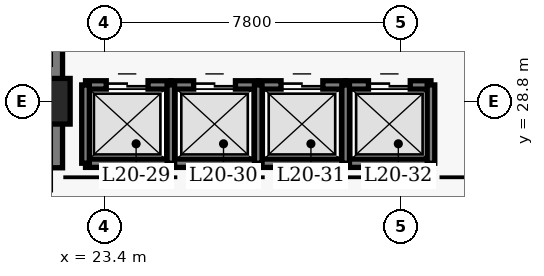
"""IFC4 building model, lengths in metres.
Left out: names, types, materials, properties, quantities, classifications, styles, units other than length and angle.
Written with IfcOpenShell. Run it as: python <this file> out.ifc"""

import sys

from ifc_helpers import new_model, si_unit, direction, frame, frame_2d, origin, origin_2d, place, context, subcontext, project, spatial, rectangle, extrude, element, fill, save


model = new_model("IFC4")
c1 = context("Model", 3, precision=1e-05, world=origin(), true_north=direction((0.0, 1.0)))
c2 = subcontext(c1, "Body", "Model", "MODEL_VIEW")
j1 = project(units=[si_unit("LENGTHUNIT", "METRE"), si_unit("PLANEANGLEUNIT", "RADIAN")], contexts=[c1])
p1 = place(None, origin())
s1 = spatial("IfcSite", under=j1, at=p1, CompositionType="ELEMENT")
p2 = place(p1, origin())
s2 = spatial("IfcBuilding", under=s1, at=p2, CompositionType="ELEMENT")
p3 = place(p2, frame((0.0, 0.0, 84.2)))
s3 = spatial("IfcBuildingStorey", under=s2, at=p3, CompositionType="ELEMENT", Elevation=84.2)
p4 = place(p3, frame((21.9, 27.05, 0.0), z_axis=(0.0, 0.0, 1.0), x_axis=(0.0, 1.0, 0.0)))
e1 = element("IfcWall", 1, at=p4, inside=s3, PredefinedType="SHEAR", context=c2, shape_type="SweptSolid", body=[
    extrude(rectangle(XDim=13.67, YDim=0.8, at=frame_2d((6.835, 0.0))), origin(), (0.0, 0.0, 1.0), 3.8),
])
p5 = place(p3, frame((21.9, 28.8, 0.0), z_axis=(0.0, 0.0, 1.0), x_axis=(1.0, 0.0, 0.0)))
e2 = element("IfcColumn", 2, at=p5, inside=s3, PredefinedType="COLUMN", context=c2, shape_type="SweptSolid", body=[
    extrude(rectangle(XDim=1.2, YDim=1.2, at=origin_2d()), origin(), (0.0, 0.0, 1.0), 3.8),
])
p6 = place(p3, frame((22.905, 29.23, 0.0), z_axis=(0.0, 0.0, 1.0), x_axis=(1.0, 0.0, 0.0)))
e3 = element("IfcWall", 3, at=p6, inside=s3, PredefinedType="SHEAR", context=c2, shape_type="SweptSolid", body=[
    extrude(rectangle(XDim=2.245, YDim=0.22, at=frame_2d((1.123, 0.0))), origin(), (0.0, 0.0, 1.0), 3.8),
])
p7 = place(p6, frame((0.545, 0.0, 0.0)))
e4 = element("IfcOpeningElement", 4, at=p7, cuts=e3, PredefinedType="OPENING", context=c2, shape_type="SweptSolid", body=[
    extrude(rectangle(XDim=1.1, YDim=2.15, at=frame_2d((0.55, 1.075))), frame((0.0, 0.12, 0.0), z_axis=(0.0, -1.0, 0.0), x_axis=(1.0, 0.0, 0.0)), (0.0, 0.0, 1.0), 0.24),
])
p8 = place(p3, frame((22.905, 27.17, 0.0), z_axis=(0.0, 0.0, 1.0), x_axis=(1.0, 0.0, 0.0)))
e5 = element("IfcWall", 5, at=p8, inside=s3, PredefinedType="SHEAR", context=c2, shape_type="SweptSolid", body=[
    extrude(rectangle(XDim=2.245, YDim=0.22, at=frame_2d((1.123, 0.0))), origin(), (0.0, 0.0, 1.0), 3.8),
])
p9 = place(p3, frame((22.905, 27.17, 0.0), z_axis=(0.0, 0.0, 1.0), x_axis=(0.0, 1.0, 0.0)))
e6 = element("IfcWall", 6, at=p9, inside=s3, PredefinedType="SHEAR", context=c2, shape_type="SweptSolid", body=[
    extrude(rectangle(XDim=2.06, YDim=0.2, at=frame_2d((1.03, 0.0))), origin(), (0.0, 0.0, 1.0), 3.8),
])
p10 = place(p3, frame((25.15, 29.23, 0.0), z_axis=(0.0, 0.0, 1.0), x_axis=(1.0, 0.0, 0.0)))
e7 = element("IfcWall", 7, at=p10, inside=s3, PredefinedType="SHEAR", context=c2, shape_type="SweptSolid", body=[
    extrude(rectangle(XDim=2.3, YDim=0.22, at=frame_2d((1.15, 0.0))), origin(), (0.0, 0.0, 1.0), 3.8),
])
p11 = place(p10, frame((0.6, 0.0, 0.0)))
e8 = element("IfcOpeningElement", 8, at=p11, cuts=e7, PredefinedType="OPENING", context=c2, shape_type="SweptSolid", body=[
    extrude(rectangle(XDim=1.1, YDim=2.15, at=frame_2d((0.55, 1.075))), frame((0.0, 0.12, 0.0), z_axis=(0.0, -1.0, 0.0), x_axis=(1.0, 0.0, 0.0)), (0.0, 0.0, 1.0), 0.24),
])
p12 = place(p3, frame((25.15, 27.17, 0.0), z_axis=(0.0, 0.0, 1.0), x_axis=(1.0, 0.0, 0.0)))
e9 = element("IfcWall", 9, at=p12, inside=s3, PredefinedType="SHEAR", context=c2, shape_type="SweptSolid", body=[
    extrude(rectangle(XDim=2.3, YDim=0.22, at=frame_2d((1.15, 0.0))), origin(), (0.0, 0.0, 1.0), 3.8),
])
p13 = place(p3, frame((25.15, 27.17, 0.0), z_axis=(0.0, 0.0, 1.0), x_axis=(0.0, 1.0, 0.0)))
e10 = element("IfcWall", 10, at=p13, inside=s3, PredefinedType="SHEAR", context=c2, shape_type="SweptSolid", body=[
    extrude(rectangle(XDim=2.06, YDim=0.2, at=frame_2d((1.03, 0.0))), origin(), (0.0, 0.0, 1.0), 3.8),
])
p14 = place(p3, frame((27.45, 29.23, 0.0), z_axis=(0.0, 0.0, 1.0), x_axis=(1.0, 0.0, 0.0)))
e11 = element("IfcWall", 11, at=p14, inside=s3, PredefinedType="SHEAR", context=c2, shape_type="SweptSolid", body=[
    extrude(rectangle(XDim=2.3, YDim=0.22, at=frame_2d((1.15, 0.0))), origin(), (0.0, 0.0, 1.0), 3.8),
])
p15 = place(p14, frame((0.6, 0.0, 0.0)))
e12 = element("IfcOpeningElement", 12, at=p15, cuts=e11, PredefinedType="OPENING", context=c2, shape_type="SweptSolid", body=[
    extrude(rectangle(XDim=1.1, YDim=2.15, at=frame_2d((0.55, 1.075))), frame((0.0, 0.12, 0.0), z_axis=(0.0, -1.0, 0.0), x_axis=(1.0, 0.0, 0.0)), (0.0, 0.0, 1.0), 0.24),
])
p16 = place(p3, frame((27.45, 27.17, 0.0), z_axis=(0.0, 0.0, 1.0), x_axis=(1.0, 0.0, 0.0)))
e13 = element("IfcWall", 13, at=p16, inside=s3, PredefinedType="SHEAR", context=c2, shape_type="SweptSolid", body=[
    extrude(rectangle(XDim=2.3, YDim=0.22, at=frame_2d((1.15, 0.0))), origin(), (0.0, 0.0, 1.0), 3.8),
])
p17 = place(p3, frame((27.45, 27.17, 0.0), z_axis=(0.0, 0.0, 1.0), x_axis=(0.0, 1.0, 0.0)))
e14 = element("IfcWall", 14, at=p17, inside=s3, PredefinedType="SHEAR", context=c2, shape_type="SweptSolid", body=[
    extrude(rectangle(XDim=2.06, YDim=0.2, at=frame_2d((1.03, 0.0))), origin(), (0.0, 0.0, 1.0), 3.8),
])
p18 = place(p3, frame((29.75, 29.23, 0.0), z_axis=(0.0, 0.0, 1.0), x_axis=(1.0, 0.0, 0.0)))
e15 = element("IfcWall", 15, at=p18, inside=s3, PredefinedType="SHEAR", context=c2, shape_type="SweptSolid", body=[
    extrude(rectangle(XDim=2.245, YDim=0.22, at=frame_2d((1.123, 0.0))), origin(), (0.0, 0.0, 1.0), 3.8),
])
p19 = place(p18, frame((0.6, 0.0, 0.0)))
e16 = element("IfcOpeningElement", 16, at=p19, cuts=e15, PredefinedType="OPENING", context=c2, shape_type="SweptSolid", body=[
    extrude(rectangle(XDim=1.1, YDim=2.15, at=frame_2d((0.55, 1.075))), frame((0.0, 0.12, 0.0), z_axis=(0.0, -1.0, 0.0), x_axis=(1.0, 0.0, 0.0)), (0.0, 0.0, 1.0), 0.24),
])
p20 = place(p3, frame((29.75, 27.17, 0.0), z_axis=(0.0, 0.0, 1.0), x_axis=(1.0, 0.0, 0.0)))
e17 = element("IfcWall", 17, at=p20, inside=s3, PredefinedType="SHEAR", context=c2, shape_type="SweptSolid", body=[
    extrude(rectangle(XDim=2.245, YDim=0.22, at=frame_2d((1.123, 0.0))), origin(), (0.0, 0.0, 1.0), 3.8),
])
for number, where, z_axis, x_axis in (
    (18, (29.75, 27.17, 0.0), (0.0, 0.0, 1.0), (0.0, 1.0, 0.0)),
    (19, (31.995, 27.17, 0.0), (0.0, 0.0, 1.0), (0.0, 1.0, 0.0)),
):
    element("IfcWall", number, at=place(p3, frame(where, z_axis=z_axis, x_axis=x_axis)), inside=s3, PredefinedType="SHEAR", context=c2, shape_type="SweptSolid", body=[
        extrude(rectangle(XDim=2.06, YDim=0.2, at=frame_2d((1.03, 0.0))), origin(), (0.0, 0.0, 1.0), 3.8),
    ])
p21 = place(p7, origin())
e20 = element("IfcDoor", 20, at=p21, inside=s3, OperationType="DOUBLE_DOOR_SLIDING", PredefinedType="DOOR", context=c2, shape_type="SweptSolid", body=[
    extrude(rectangle(XDim=1.1, YDim=2.15, at=frame_2d((0.55, 1.075))), frame((0.0, 0.025, 0.0), z_axis=(0.0, -1.0, 0.0), x_axis=(1.0, 0.0, 0.0)), (0.0, 0.0, 1.0), 0.05),
])
fill(e4, e20)
p22 = place(p11, origin())
e21 = element("IfcDoor", 21, at=p22, inside=s3, OperationType="DOUBLE_DOOR_SLIDING", PredefinedType="DOOR", context=c2, shape_type="SweptSolid", body=[
    extrude(rectangle(XDim=1.1, YDim=2.15, at=frame_2d((0.55, 1.075))), frame((0.0, 0.025, 0.0), z_axis=(0.0, -1.0, 0.0), x_axis=(1.0, 0.0, 0.0)), (0.0, 0.0, 1.0), 0.05),
])
fill(e8, e21)
p23 = place(p15, origin())
e22 = element("IfcDoor", 22, at=p23, inside=s3, OperationType="DOUBLE_DOOR_SLIDING", PredefinedType="DOOR", context=c2, shape_type="SweptSolid", body=[
    extrude(rectangle(XDim=1.1, YDim=2.15, at=frame_2d((0.55, 1.075))), frame((0.0, 0.025, 0.0), z_axis=(0.0, -1.0, 0.0), x_axis=(1.0, 0.0, 0.0)), (0.0, 0.0, 1.0), 0.05),
])
fill(e12, e22)
p24 = place(p19, origin())
e23 = element("IfcDoor", 23, at=p24, inside=s3, OperationType="DOUBLE_DOOR_SLIDING", PredefinedType="DOOR", context=c2, shape_type="SweptSolid", body=[
    extrude(rectangle(XDim=1.1, YDim=2.15, at=frame_2d((0.55, 1.075))), frame((0.0, 0.025, 0.0), z_axis=(0.0, -1.0, 0.0), x_axis=(1.0, 0.0, 0.0)), (0.0, 0.0, 1.0), 0.05),
])
fill(e16, e23)
save(model, sys.argv[1])
